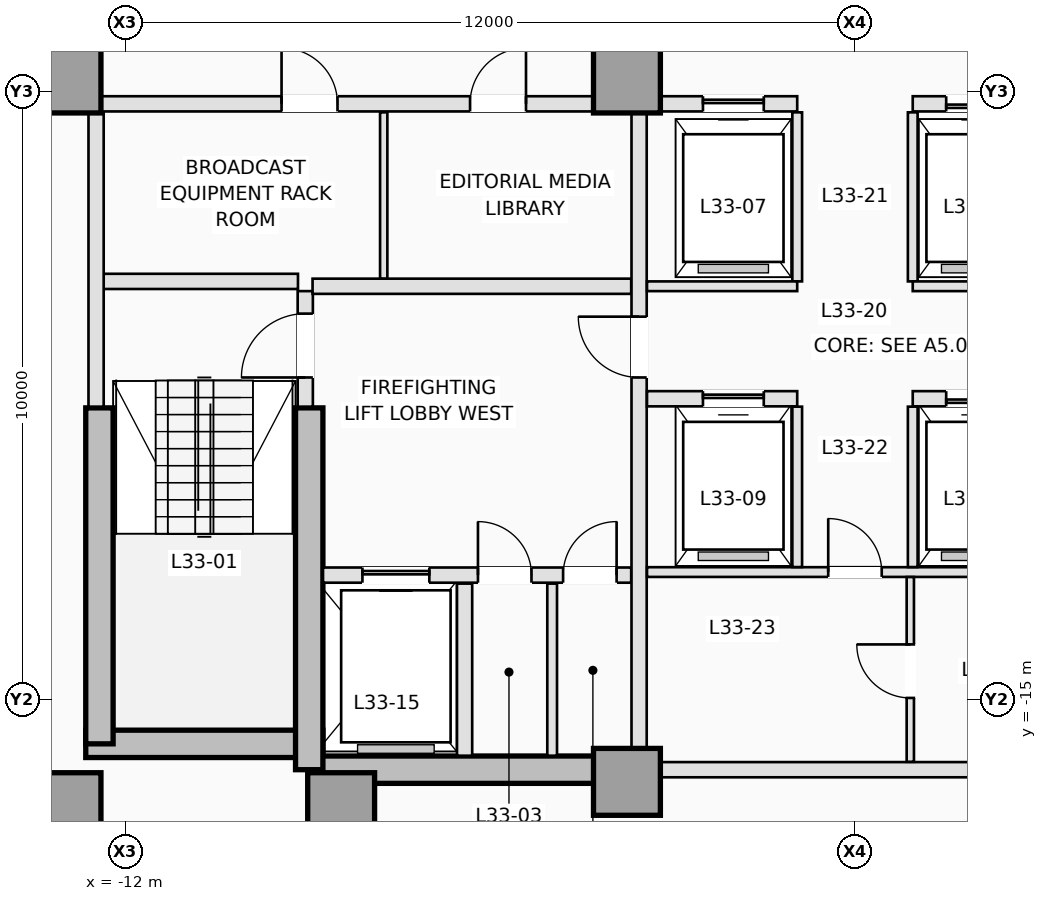
"""IFC4 building model, lengths in metres.
Left out: names, types, materials, properties, quantities, classifications, styles, units other than length and angle.
Written with IfcOpenShell. Run it as: python <this file> out.ifc"""

import sys

from ifc_helpers import new_model, si_unit, direction, frame, frame_2d, origin, origin_2d, place, context, subcontext, project, spatial, rectangle, extrude, element, fill, save


model = new_model("IFC4")
c1 = context("Model", 3, precision=1e-05, world=origin(), true_north=direction((0.0, 1.0)))
c2 = subcontext(c1, "Body", "Model", "MODEL_VIEW")
j1 = project(units=[si_unit("LENGTHUNIT", "METRE"), si_unit("PLANEANGLEUNIT", "RADIAN")], contexts=[c1])
p1 = place(None, origin())
s1 = spatial("IfcSite", under=j1, at=p1, CompositionType="ELEMENT")
p2 = place(p1, origin())
s2 = spatial("IfcBuilding", under=s1, at=p2, CompositionType="ELEMENT")
p3 = place(p2, frame((0.0, 0.0, 123.0)))
s3 = spatial("IfcBuildingStorey", under=s2, at=p3, CompositionType="ELEMENT", Elevation=123.0)
p4 = place(p3, frame((-12.65, -15.725, 0.0), z_axis=(0.0, 0.0, 1.0), x_axis=(1.0, 0.0, 0.0)))
e1 = element("IfcWall", 1, at=p4, inside=s3, PredefinedType="SHEAR", context=c2, shape_type="SweptSolid", body=[
    extrude(rectangle(XDim=3.9, YDim=0.45, at=frame_2d((1.95, 0.0))), origin(), (0.0, 0.0, 1.0), 3.5),
])
p5 = place(p3, frame((-8.975, -16.15, 0.0), z_axis=(0.0, 0.0, 1.0), x_axis=(1.0, 0.0, 0.0)))
e2 = element("IfcWall", 2, at=p5, inside=s3, PredefinedType="SHEAR", context=c2, shape_type="SweptSolid", body=[
    extrude(rectangle(XDim=5.225, YDim=0.45, at=frame_2d((2.613, 0.0))), origin(), (0.0, 0.0, 1.0), 3.5),
])
p6 = place(p3, frame((-12.425, -15.725, 0.0), z_axis=(0.0, 0.0, 1.0), x_axis=(0.0, 1.0, 0.0)))
e3 = element("IfcWall", 3, at=p6, inside=s3, PredefinedType="SHEAR", context=c2, shape_type="SweptSolid", body=[
    extrude(rectangle(XDim=5.525, YDim=0.45, at=frame_2d((2.763, 0.0))), origin(), (0.0, 0.0, 1.0), 3.5),
])
p7 = place(p3, frame((-8.975, -16.15, 0.0), z_axis=(0.0, 0.0, 1.0), x_axis=(0.0, 1.0, 0.0)))
e4 = element("IfcWall", 4, at=p7, inside=s3, PredefinedType="SHEAR", context=c2, shape_type="SweptSolid", body=[
    extrude(rectangle(XDim=5.95, YDim=0.45, at=frame_2d((2.975, 0.0))), origin(), (0.0, 0.0, 1.0), 3.5),
])
for number, where, z_axis, x_axis in (
    (5, (-12.95, -16.75, 0.0), (0.0, 0.0, 1.0), (1.0, 0.0, 0.0)),
    (6, (-8.45, -16.75, 0.0), (0.0, 0.0, 1.0), (1.0, 0.0, 0.0)),
    (7, (-3.75, -16.35, 0.0), (0.0, 0.0, 1.0), (1.0, 0.0, 0.0)),
    (8, (-12.95, -4.8, 0.0), (0.0, 0.0, 1.0), (1.0, 0.0, 0.0)),
    (9, (-3.75, -4.8, 0.0), (0.0, 0.0, 1.0), (1.0, 0.0, 0.0)),
):
    element("IfcColumn", number, at=place(p3, frame(where, z_axis=z_axis, x_axis=x_axis)), inside=s3, PredefinedType="COLUMN", context=c2, shape_type="SweptSolid", body=[
        extrude(rectangle(XDim=1.1, YDim=1.1, at=origin_2d()), origin(), (0.0, 0.0, 1.0), 3.5),
    ])
p8 = place(p3, frame((-9.04, -10.18, 0.0), z_axis=(0.0, 0.0, 1.0), x_axis=(0.0, 1.0, 0.0)))
e10 = element("IfcWall", 10, at=p8, inside=s3, PredefinedType="PARTITIONING", context=c2, shape_type="SweptSolid", body=[
    extrude(rectangle(XDim=1.9, YDim=0.25, at=frame_2d((0.95, 0.0))), origin(), (0.0, 0.0, 1.0), 3.25),
])
p9 = place(p8, frame((0.48, 0.0, 0.0)))
e11 = element("IfcOpeningElement", 11, at=p9, cuts=e10, PredefinedType="OPENING", context=c2, shape_type="SweptSolid", body=[
    extrude(rectangle(XDim=1.05, YDim=2.15, at=frame_2d((0.525, 1.075))), frame((0.0, 0.135, 0.0), z_axis=(0.0, -1.0, 0.0), x_axis=(1.0, 0.0, 0.0)), (0.0, 0.0, 1.0), 0.27),
])
p10 = place(p3, frame((-12.38, -8.12, 0.0), z_axis=(0.0, 0.0, 1.0), x_axis=(1.0, 0.0, 0.0)))
e12 = element("IfcWall", 12, at=p10, inside=s3, PredefinedType="PARTITIONING", context=c2, shape_type="SweptSolid", body=[
    extrude(rectangle(XDim=3.22, YDim=0.25, at=frame_2d((1.61, 0.0))), origin(), (0.0, 0.0, 1.0), 3.25),
])
p11 = place(p3, frame((-12.48, -10.18, 0.0), z_axis=(0.0, 0.0, 1.0), x_axis=(0.0, 1.0, 0.0)))
e13 = element("IfcWall", 13, at=p11, inside=s3, PredefinedType="PARTITIONING", context=c2, shape_type="SweptSolid", body=[
    extrude(rectangle(XDim=4.828, YDim=0.25, at=frame_2d((2.414, 0.0))), origin(), (0.0, 0.0, 1.0), 3.25),
])
p12 = place(p3, frame((-8.748, -12.95, 0.0), z_axis=(0.0, 0.0, 1.0), x_axis=(1.0, 0.0, 0.0)))
e14 = element("IfcWall", 14, at=p12, inside=s3, PredefinedType="PARTITIONING", context=c2, shape_type="SweptSolid", body=[
    extrude(rectangle(XDim=5.068, YDim=0.25, at=frame_2d((2.534, 0.0))), origin(), (0.0, 0.0, 1.0), 3.25),
])
p13 = place(p12, frame((0.648, 0.0, 0.0)))
e15 = element("IfcOpeningElement", 15, at=p13, cuts=e14, PredefinedType="OPENING", context=c2, shape_type="SweptSolid", body=[
    extrude(rectangle(XDim=1.1, YDim=2.15, at=frame_2d((0.55, 1.075))), frame((0.0, 0.135, 0.0), z_axis=(0.0, -1.0, 0.0), x_axis=(1.0, 0.0, 0.0)), (0.0, 0.0, 1.0), 0.27),
])
p14 = place(p12, frame((2.548, 0.0, 0.0)))
e16 = element("IfcOpeningElement", 16, at=p14, cuts=e14, PredefinedType="OPENING", context=c2, shape_type="SweptSolid", body=[
    extrude(rectangle(XDim=0.88, YDim=2.1, at=frame_2d((0.44, 1.05))), frame((0.0, 0.135, 0.0), z_axis=(0.0, -1.0, 0.0), x_axis=(1.0, 0.0, 0.0)), (0.0, 0.0, 1.0), 0.27),
])
p15 = place(p12, frame((3.948, 0.0, 0.0)))
e17 = element("IfcOpeningElement", 17, at=p15, cuts=e14, PredefinedType="OPENING", context=c2, shape_type="SweptSolid", body=[
    extrude(rectangle(XDim=0.88, YDim=2.1, at=frame_2d((0.44, 1.05))), frame((0.0, 0.135, 0.0), z_axis=(0.0, -1.0, 0.0), x_axis=(1.0, 0.0, 0.0)), (0.0, 0.0, 1.0), 0.27),
])
p16 = place(p3, frame((-6.42, -15.92, 0.0), z_axis=(0.0, 0.0, 1.0), x_axis=(0.0, 1.0, 0.0)))
e18 = element("IfcWall", 18, at=p16, inside=s3, PredefinedType="PARTITIONING", context=c2, shape_type="SweptSolid", body=[
    extrude(rectangle(XDim=2.83, YDim=0.25, at=frame_2d((1.415, 0.0))), origin(), (0.0, 0.0, 1.0), 3.25),
])
p17 = place(p3, frame((-4.98, -15.92, 0.0), z_axis=(0.0, 0.0, 1.0), x_axis=(0.0, 1.0, 0.0)))
e19 = element("IfcWall", 19, at=p17, inside=s3, PredefinedType="PARTITIONING", context=c2, shape_type="SweptSolid", body=[
    extrude(rectangle(XDim=2.83, YDim=0.16, at=frame_2d((1.415, 0.0))), origin(), (0.0, 0.0, 1.0), 3.25),
])
p18 = place(p3, frame((-8.92, -8.2, 0.0), z_axis=(0.0, 0.0, 1.0), x_axis=(1.0, 0.0, 0.0)))
e20 = element("IfcWall", 20, at=p18, inside=s3, PredefinedType="PARTITIONING", context=c2, shape_type="SweptSolid", body=[
    extrude(rectangle(XDim=5.24, YDim=0.25, at=frame_2d((2.62, 0.0))), origin(), (0.0, 0.0, 1.0), 3.25),
])
p19 = place(p3, frame((-3.55, -15.798, 0.0), z_axis=(0.0, 0.0, 1.0), x_axis=(0.0, 1.0, 0.0)))
e21 = element("IfcWall", 21, at=p19, inside=s3, PredefinedType="PARTITIONING", context=c2, shape_type="SweptSolid", body=[
    extrude(rectangle(XDim=10.446, YDim=0.25, at=frame_2d((5.223, 0.0))), origin(), (0.0, 0.0, 1.0), 3.25),
])
p20 = place(p19, frame((6.098, 0.0, 0.0)))
e22 = element("IfcOpeningElement", 22, at=p20, cuts=e21, PredefinedType="OPENING", context=c2, shape_type="SweptSolid", body=[
    extrude(rectangle(XDim=1.0, YDim=2.15, at=frame_2d((0.5, 1.075))), frame((0.0, 0.135, 0.0), z_axis=(0.0, -1.0, 0.0), x_axis=(1.0, 0.0, 0.0)), (0.0, 0.0, 1.0), 0.27),
])
p21 = place(p3, frame((-12.398, -5.2, 0.0), z_axis=(0.0, 0.0, 1.0), x_axis=(1.0, 0.0, 0.0)))
e23 = element("IfcWall", 23, at=p21, inside=s3, PredefinedType="PARTITIONING", context=c2, shape_type="SweptSolid", body=[
    extrude(rectangle(XDim=8.096, YDim=0.25, at=frame_2d((4.048, 0.0))), origin(), (0.0, 0.0, 1.0), 3.25),
])
p22 = place(p21, frame((2.968, 0.0, 0.0)))
e24 = element("IfcOpeningElement", 24, at=p22, cuts=e23, PredefinedType="OPENING", context=c2, shape_type="SweptSolid", body=[
    extrude(rectangle(XDim=0.92, YDim=2.12, at=frame_2d((0.46, 1.06))), frame((0.0, 0.135, 0.0), z_axis=(0.0, -1.0, 0.0), x_axis=(1.0, 0.0, 0.0)), (0.0, 0.0, 1.0), 0.27),
])
p23 = place(p21, frame((6.068, 0.0, 0.0)))
e25 = element("IfcOpeningElement", 25, at=p23, cuts=e23, PredefinedType="OPENING", context=c2, shape_type="SweptSolid", body=[
    extrude(rectangle(XDim=0.92, YDim=2.12, at=frame_2d((0.46, 1.06))), frame((0.0, 0.135, 0.0), z_axis=(0.0, -1.0, 0.0), x_axis=(1.0, 0.0, 0.0)), (0.0, 0.0, 1.0), 0.27),
])
p24 = place(p3, frame((-3.198, -5.2, 0.0), z_axis=(0.0, 0.0, 1.0), x_axis=(1.0, 0.0, 0.0)))
e26 = element("IfcWall", 26, at=p24, inside=s3, PredefinedType="PARTITIONING", context=c2, shape_type="SweptSolid", body=[
    extrude(rectangle(XDim=2.248, YDim=0.25, at=frame_2d((1.124, 0.0))), origin(), (0.0, 0.0, 1.0), 3.25),
])
p25 = place(p24, frame((0.698, 0.0, 0.0)))
e27 = element("IfcOpeningElement", 27, at=p25, cuts=e26, PredefinedType="OPENING", context=c2, shape_type="SweptSolid", body=[
    extrude(rectangle(XDim=1.0, YDim=2.15, at=frame_2d((0.5, 1.075))), frame((0.0, 0.135, 0.0), z_axis=(0.0, -1.0, 0.0), x_axis=(1.0, 0.0, 0.0)), (0.0, 0.0, 1.0), 0.27),
])
p26 = place(p3, frame((0.95, -5.2, 0.0), z_axis=(0.0, 0.0, 1.0), x_axis=(1.0, 0.0, 0.0)))
e28 = element("IfcWall", 28, at=p26, inside=s3, PredefinedType="PARTITIONING", context=c2, shape_type="SweptSolid", body=[
    extrude(rectangle(XDim=2.248, YDim=0.25, at=frame_2d((1.124, 0.0))), origin(), (0.0, 0.0, 1.0), 3.25),
])
p27 = place(p26, frame((0.55, 0.0, 0.0)))
e29 = element("IfcOpeningElement", 29, at=p27, cuts=e28, PredefinedType="OPENING", context=c2, shape_type="SweptSolid", body=[
    extrude(rectangle(XDim=1.0, YDim=2.15, at=frame_2d((0.5, 1.075))), frame((0.0, 0.135, 0.0), z_axis=(0.0, -1.0, 0.0), x_axis=(1.0, 0.0, 0.0)), (0.0, 0.0, 1.0), 0.27),
])
p28 = place(p3, frame((-7.75, -8.073, 0.0), z_axis=(0.0, 0.0, 1.0), x_axis=(0.0, 1.0, 0.0)))
e30 = element("IfcWall", 30, at=p28, inside=s3, PredefinedType="PARTITIONING", context=c2, shape_type="SweptSolid", body=[
    extrude(rectangle(XDim=2.733, YDim=0.12, at=frame_2d((1.366, 0.0))), origin(), (0.0, 0.0, 1.0), 3.25),
])
p29 = place(p3, frame((-3.198, -16.15, 0.0), z_axis=(0.0, 0.0, 1.0), x_axis=(1.0, 0.0, 0.0)))
e31 = element("IfcWall", 31, at=p29, inside=s3, PredefinedType="PARTITIONING", context=c2, shape_type="SweptSolid", body=[
    extrude(rectangle(XDim=6.396, YDim=0.25, at=frame_2d((3.198, 0.0))), origin(), (0.0, 0.0, 1.0), 2.3),
])
for number, where, z_axis, x_axis in (
    (32, (-0.95, -8.12, 0.0), (0.0, 0.0, 1.0), (0.0, 1.0, 0.0)),
    (33, (0.95, -8.12, 0.0), (0.0, 0.0, 1.0), (0.0, 1.0, 0.0)),
):
    element("IfcWall", number, at=place(p3, frame(where, z_axis=z_axis, x_axis=x_axis)), inside=s3, PredefinedType="PARTITIONING", context=c2, shape_type="SweptSolid", body=[
        extrude(rectangle(XDim=2.78, YDim=0.16, at=frame_2d((1.39, 0.0))), origin(), (0.0, 0.0, 1.0), 3.25),
    ])
for number, where, z_axis, x_axis in (
    (34, (-3.42, -8.2, 0.0), (0.0, 0.0, 1.0), (1.0, 0.0, 0.0)),
    (35, (0.95, -8.2, 0.0), (0.0, 0.0, 1.0), (1.0, 0.0, 0.0)),
):
    element("IfcWall", number, at=place(p3, frame(where, z_axis=z_axis, x_axis=x_axis)), inside=s3, PredefinedType="PARTITIONING", context=c2, shape_type="SweptSolid", body=[
        extrude(rectangle(XDim=2.47, YDim=0.16, at=frame_2d((1.235, 0.0))), origin(), (0.0, 0.0, 1.0), 3.25),
    ])
p30 = place(p3, frame((-3.42, -10.05, 0.0), z_axis=(0.0, 0.0, 1.0), x_axis=(1.0, 0.0, 0.0)))
e36 = element("IfcWall", 36, at=p30, inside=s3, PredefinedType="PARTITIONING", context=c2, shape_type="SweptSolid", body=[
    extrude(rectangle(XDim=2.47, YDim=0.25, at=frame_2d((1.235, 0.0))), origin(), (0.0, 0.0, 1.0), 3.25),
])
p31 = place(p30, frame((0.92, 0.0, 0.0)))
e37 = element("IfcOpeningElement", 37, at=p31, cuts=e36, PredefinedType="OPENING", context=c2, shape_type="SweptSolid", body=[
    extrude(rectangle(XDim=1.0, YDim=2.15, at=frame_2d((0.5, 1.075))), frame((0.0, 0.135, 0.0), z_axis=(0.0, -1.0, 0.0), x_axis=(1.0, 0.0, 0.0)), (0.0, 0.0, 1.0), 0.27),
])
p32 = place(p3, frame((0.95, -10.05, 0.0), z_axis=(0.0, 0.0, 1.0), x_axis=(1.0, 0.0, 0.0)))
e38 = element("IfcWall", 38, at=p32, inside=s3, PredefinedType="PARTITIONING", context=c2, shape_type="SweptSolid", body=[
    extrude(rectangle(XDim=2.47, YDim=0.25, at=frame_2d((1.235, 0.0))), origin(), (0.0, 0.0, 1.0), 3.25),
])
p33 = place(p32, frame((0.55, 0.0, 0.0)))
e39 = element("IfcOpeningElement", 39, at=p33, cuts=e38, PredefinedType="OPENING", context=c2, shape_type="SweptSolid", body=[
    extrude(rectangle(XDim=1.0, YDim=2.15, at=frame_2d((0.5, 1.075))), frame((0.0, 0.135, 0.0), z_axis=(0.0, -1.0, 0.0), x_axis=(1.0, 0.0, 0.0)), (0.0, 0.0, 1.0), 0.27),
])
p34 = place(p3, frame((-3.42, -12.9, 0.0), z_axis=(0.0, 0.0, 1.0), x_axis=(1.0, 0.0, 0.0)))
e40 = element("IfcWall", 40, at=p34, inside=s3, PredefinedType="PARTITIONING", context=c2, shape_type="SweptSolid", body=[
    extrude(rectangle(XDim=6.84, YDim=0.16, at=frame_2d((3.42, 0.0))), origin(), (0.0, 0.0, 1.0), 3.25),
])
p35 = place(p34, frame((2.98, 0.0, 0.0)))
e41 = element("IfcOpeningElement", 41, at=p35, cuts=e40, PredefinedType="OPENING", context=c2, shape_type="SweptSolid", body=[
    extrude(rectangle(XDim=0.88, YDim=2.12, at=frame_2d((0.44, 1.06))), frame((0.0, 0.09, 0.0), z_axis=(0.0, -1.0, 0.0), x_axis=(1.0, 0.0, 0.0)), (0.0, 0.0, 1.0), 0.18),
])
for number, where, z_axis, x_axis in (
    (42, (-0.95, -12.818, 0.0), (0.0, 0.0, 1.0), (0.0, 1.0, 0.0)),
    (43, (0.95, -12.818, 0.0), (0.0, 0.0, 1.0), (0.0, 1.0, 0.0)),
):
    element("IfcWall", number, at=place(p3, frame(where, z_axis=z_axis, x_axis=x_axis)), inside=s3, PredefinedType="PARTITIONING", context=c2, shape_type="SweptSolid", body=[
        extrude(rectangle(XDim=2.638, YDim=0.16, at=frame_2d((1.319, 0.0))), origin(), (0.0, 0.0, 1.0), 3.25),
    ])
p36 = place(p3, frame((0.91, -16.02, 0.0), z_axis=(0.0, 0.0, 1.0), x_axis=(0.0, 1.0, 0.0)))
e44 = element("IfcWall", 44, at=p36, inside=s3, PredefinedType="PARTITIONING", context=c2, shape_type="SweptSolid", body=[
    extrude(rectangle(XDim=3.038, YDim=0.12, at=frame_2d((1.519, 0.0))), origin(), (0.0, 0.0, 1.0), 3.25),
])
p37 = place(p36, frame((1.05, 0.0, 0.0)))
e45 = element("IfcOpeningElement", 45, at=p37, cuts=e44, PredefinedType="OPENING", context=c2, shape_type="SweptSolid", body=[
    extrude(rectangle(XDim=0.88, YDim=2.12, at=frame_2d((0.44, 1.06))), frame((0.0, 0.07, 0.0), z_axis=(0.0, -1.0, 0.0), x_axis=(1.0, 0.0, 0.0)), (0.0, 0.0, 1.0), 0.14),
])
p38 = place(p25, origin())
e46 = element("IfcDoor", 46, at=p38, inside=s3, OperationType="SLIDING_TO_LEFT", PredefinedType="DOOR", context=c2, shape_type="SweptSolid", body=[
    extrude(rectangle(XDim=1.0, YDim=2.15, at=frame_2d((0.5, 1.075))), frame((0.0, 0.025, 0.0), z_axis=(0.0, -1.0, 0.0), x_axis=(1.0, 0.0, 0.0)), (0.0, 0.0, 1.0), 0.05),
])
fill(e27, e46)
p39 = place(p27, origin())
e47 = element("IfcDoor", 47, at=p39, inside=s3, OperationType="SLIDING_TO_RIGHT", PredefinedType="DOOR", context=c2, shape_type="SweptSolid", body=[
    extrude(rectangle(XDim=1.0, YDim=2.15, at=frame_2d((0.5, 1.075))), frame((0.0, 0.025, 0.0), z_axis=(0.0, -1.0, 0.0), x_axis=(1.0, 0.0, 0.0)), (0.0, 0.0, 1.0), 0.05),
])
fill(e29, e47)
p40 = place(p13, origin())
e48 = element("IfcDoor", 48, at=p40, inside=s3, OperationType="SLIDING_TO_LEFT", PredefinedType="DOOR", context=c2, shape_type="SweptSolid", body=[
    extrude(rectangle(XDim=1.1, YDim=2.15, at=frame_2d((0.55, 1.075))), frame((0.0, 0.025, 0.0), z_axis=(0.0, -1.0, 0.0), x_axis=(1.0, 0.0, 0.0)), (0.0, 0.0, 1.0), 0.05),
])
fill(e15, e48)
p41 = place(p31, origin())
e49 = element("IfcDoor", 49, at=p41, inside=s3, OperationType="SLIDING_TO_LEFT", PredefinedType="DOOR", context=c2, shape_type="SweptSolid", body=[
    extrude(rectangle(XDim=1.0, YDim=2.15, at=frame_2d((0.5, 1.075))), frame((0.0, 0.025, 0.0), z_axis=(0.0, -1.0, 0.0), x_axis=(1.0, 0.0, 0.0)), (0.0, 0.0, 1.0), 0.05),
])
fill(e37, e49)
p42 = place(p33, origin())
e50 = element("IfcDoor", 50, at=p42, inside=s3, OperationType="SLIDING_TO_RIGHT", PredefinedType="DOOR", context=c2, shape_type="SweptSolid", body=[
    extrude(rectangle(XDim=1.0, YDim=2.15, at=frame_2d((0.5, 1.075))), frame((0.0, 0.025, 0.0), z_axis=(0.0, -1.0, 0.0), x_axis=(1.0, 0.0, 0.0)), (0.0, 0.0, 1.0), 0.05),
])
fill(e39, e50)
p43 = place(p9, origin())
e51 = element("IfcDoor", 51, at=p43, inside=s3, OperationType="SINGLE_SWING_LEFT", PredefinedType="DOOR", context=c2, shape_type="SweptSolid", body=[
    extrude(rectangle(XDim=1.05, YDim=2.15, at=frame_2d((0.525, 1.075))), frame((0.0, 0.025, 0.0), z_axis=(0.0, -1.0, 0.0), x_axis=(1.0, 0.0, 0.0)), (0.0, 0.0, 1.0), 0.05),
])
fill(e11, e51)
p44 = place(p14, origin())
e52 = element("IfcDoor", 52, at=p44, inside=s3, OperationType="SINGLE_SWING_LEFT", PredefinedType="TRAPDOOR", context=c2, shape_type="SweptSolid", body=[
    extrude(rectangle(XDim=0.88, YDim=2.1, at=frame_2d((0.44, 1.05))), frame((0.0, 0.025, 0.0), z_axis=(0.0, -1.0, 0.0), x_axis=(1.0, 0.0, 0.0)), (0.0, 0.0, 1.0), 0.05),
])
fill(e16, e52)
p45 = place(p15, origin())
e53 = element("IfcDoor", 53, at=p45, inside=s3, OperationType="SINGLE_SWING_RIGHT", PredefinedType="TRAPDOOR", context=c2, shape_type="SweptSolid", body=[
    extrude(rectangle(XDim=0.88, YDim=2.1, at=frame_2d((0.44, 1.05))), frame((0.0, 0.025, 0.0), z_axis=(0.0, -1.0, 0.0), x_axis=(1.0, 0.0, 0.0)), (0.0, 0.0, 1.0), 0.05),
])
fill(e17, e53)
p46 = place(p20, origin())
e54 = element("IfcDoor", 54, at=p46, inside=s3, OperationType="SINGLE_SWING_RIGHT", PredefinedType="DOOR", context=c2, shape_type="SweptSolid", body=[
    extrude(rectangle(XDim=1.0, YDim=2.15, at=frame_2d((0.5, 1.075))), frame((0.0, 0.025, 0.0), z_axis=(0.0, -1.0, 0.0), x_axis=(1.0, 0.0, 0.0)), (0.0, 0.0, 1.0), 0.05),
])
fill(e22, e54)
p47 = place(p22, origin())
e55 = element("IfcDoor", 55, at=p47, inside=s3, OperationType="SINGLE_SWING_LEFT", PredefinedType="DOOR", context=c2, shape_type="SweptSolid", body=[
    extrude(rectangle(XDim=0.92, YDim=2.12, at=frame_2d((0.46, 1.06))), frame((0.0, 0.025, 0.0), z_axis=(0.0, -1.0, 0.0), x_axis=(1.0, 0.0, 0.0)), (0.0, 0.0, 1.0), 0.05),
])
fill(e24, e55)
p48 = place(p23, origin())
e56 = element("IfcDoor", 56, at=p48, inside=s3, OperationType="SINGLE_SWING_RIGHT", PredefinedType="DOOR", context=c2, shape_type="SweptSolid", body=[
    extrude(rectangle(XDim=0.92, YDim=2.12, at=frame_2d((0.46, 1.06))), frame((0.0, 0.025, 0.0), z_axis=(0.0, -1.0, 0.0), x_axis=(1.0, 0.0, 0.0)), (0.0, 0.0, 1.0), 0.05),
])
fill(e25, e56)
p49 = place(p35, origin())
e57 = element("IfcDoor", 57, at=p49, inside=s3, OperationType="SINGLE_SWING_LEFT", PredefinedType="DOOR", context=c2, shape_type="SweptSolid", body=[
    extrude(rectangle(XDim=0.88, YDim=2.12, at=frame_2d((0.44, 1.06))), frame((0.0, 0.025, 0.0), z_axis=(0.0, -1.0, 0.0), x_axis=(1.0, 0.0, 0.0)), (0.0, 0.0, 1.0), 0.05),
])
fill(e41, e57)
p50 = place(p37, origin())
e58 = element("IfcDoor", 58, at=p50, inside=s3, OperationType="SINGLE_SWING_RIGHT", PredefinedType="DOOR", context=c2, shape_type="SweptSolid", body=[
    extrude(rectangle(XDim=0.88, YDim=2.12, at=frame_2d((0.44, 1.06))), frame((0.0, 0.025, 0.0), z_axis=(0.0, -1.0, 0.0), x_axis=(1.0, 0.0, 0.0)), (0.0, 0.0, 1.0), 0.05),
])
fill(e45, e58)
save(model, sys.argv[1])
